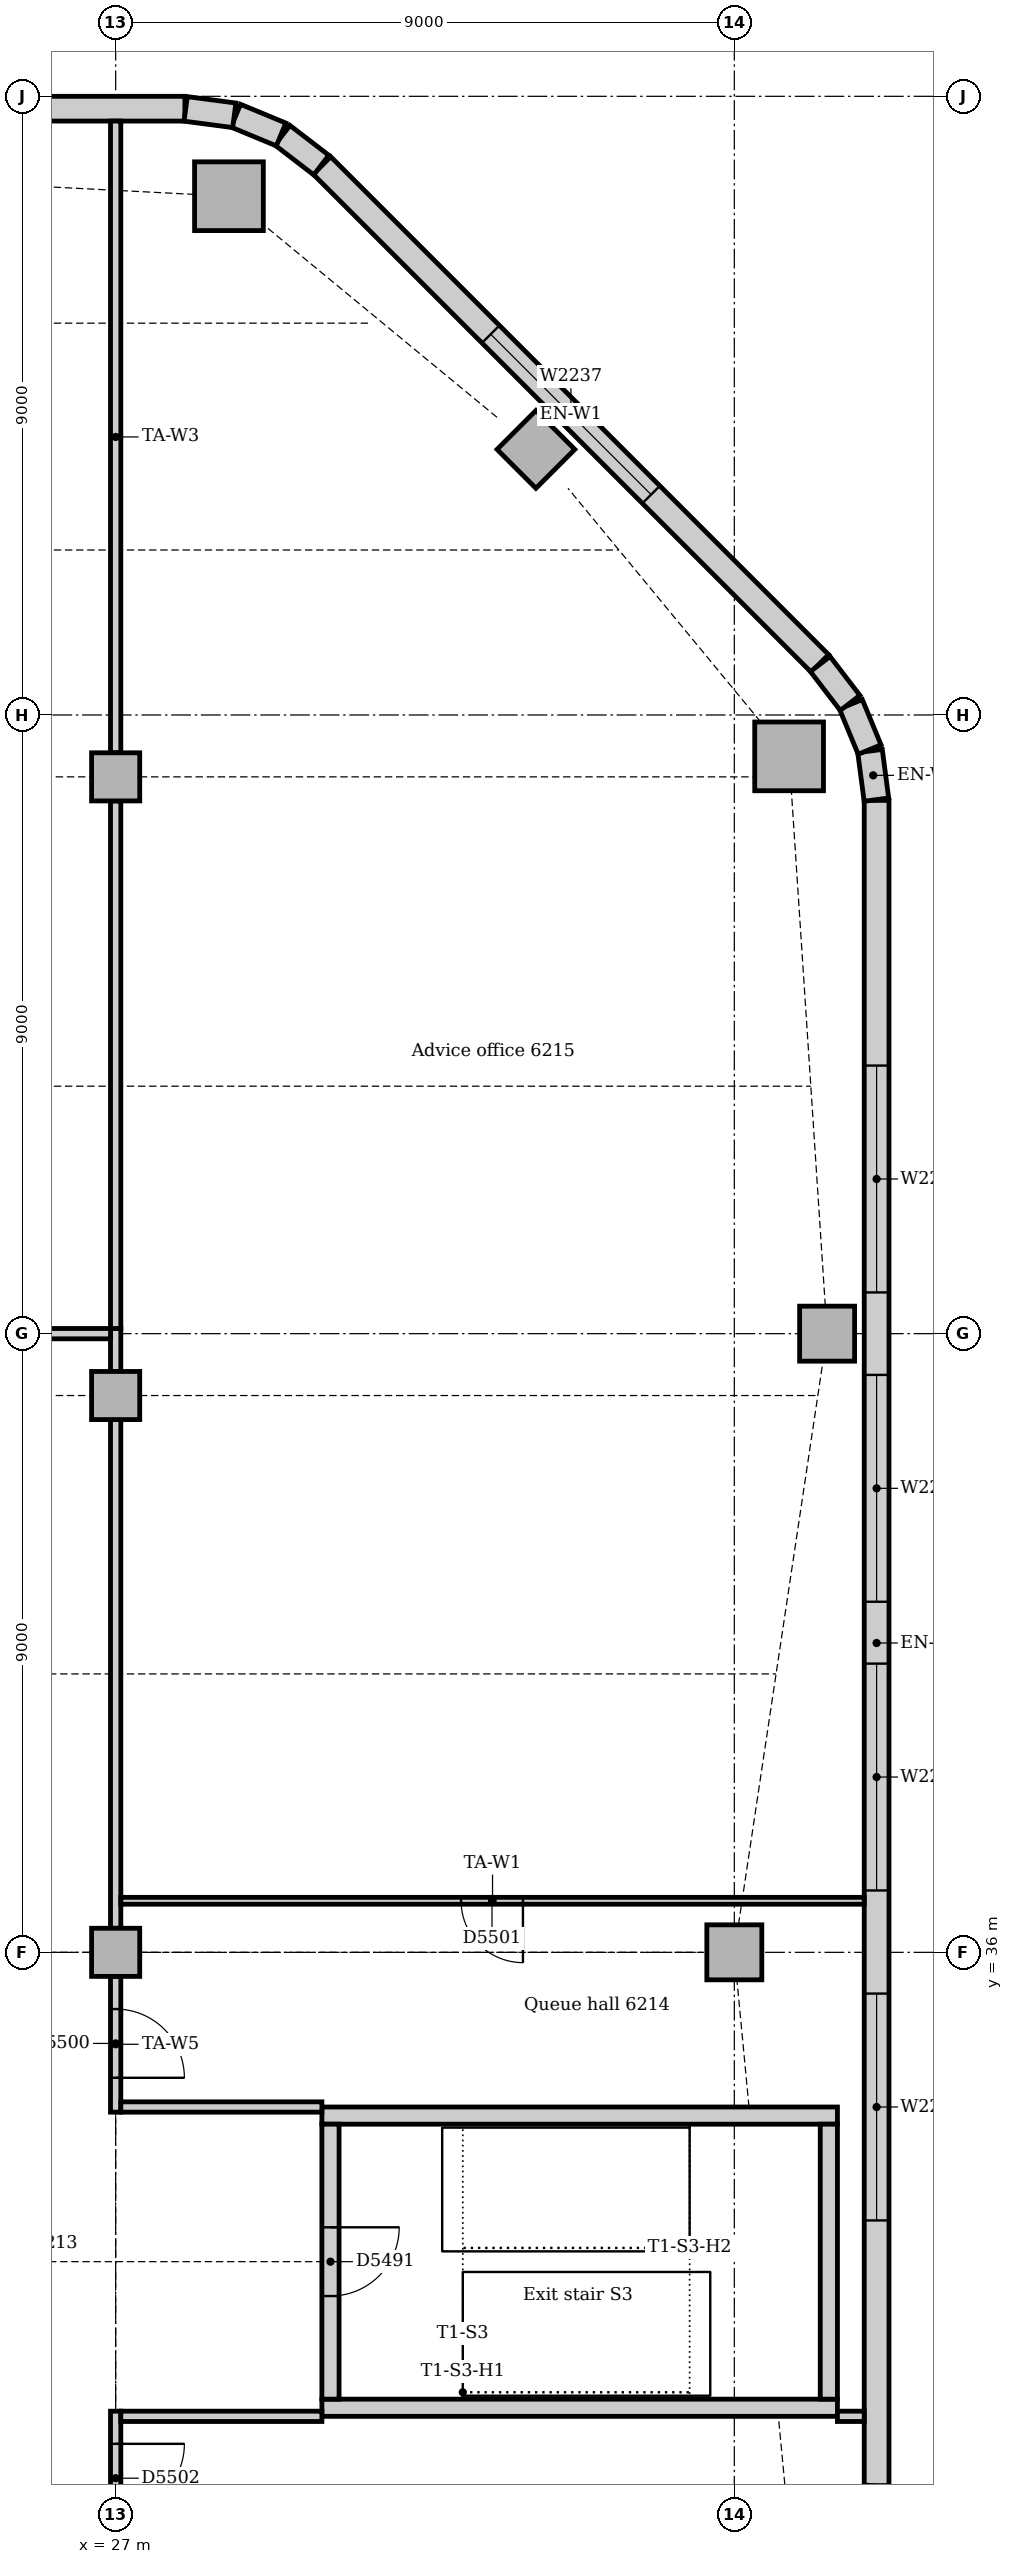
"""IFC4 building model, lengths in metres.
Left out: names, types, materials, properties, quantities, classifications, styles, units other than length and angle.
Written with IfcOpenShell. Run it as: python <this file> out.ifc"""

import sys

from ifc_helpers import new_model, si_unit, direction, frame, frame_2d, origin, origin_2d, place, context, subcontext, project, spatial, rectangle, extrude, element, fill, save


model = new_model("IFC4")
c1 = context("Model", 3, precision=1e-05, world=origin(), true_north=direction((0.0, 1.0)))
c2 = subcontext(c1, "Body", "Model", "MODEL_VIEW")
j1 = project(units=[si_unit("LENGTHUNIT", "METRE"), si_unit("PLANEANGLEUNIT", "RADIAN")], contexts=[c1])
p1 = place(None, origin())
s1 = spatial("IfcSite", under=j1, at=p1, CompositionType="ELEMENT")
p2 = place(p1, origin())
s2 = spatial("IfcBuilding", under=s1, at=p2, CompositionType="ELEMENT")
p3 = place(p2, frame((0.0, 0.0, 259.0)))
s3 = spatial("IfcBuildingStorey", under=s2, at=p3, CompositionType="ELEMENT", Elevation=259.0)
for number, where, z_axis, x_axis in (
    (1, (30.0, 29.375, 0.0), (0.0, 0.0, 1.0), (1.0, 0.0, 0.0)),
    (2, (37.5, 33.625, 0.0), (0.0, 0.0, 1.0), (-1.0, 0.0, 0.0)),
):
    element("IfcWall", number, at=place(p3, frame(where, z_axis=z_axis, x_axis=x_axis)), inside=s3, PredefinedType="SOLIDWALL", context=c2, shape_type="SweptSolid", body=[
        extrude(rectangle(XDim=7.5, YDim=0.25, at=frame_2d((3.75, 0.0))), origin(), (0.0, 0.0, 1.0), 4.0),
    ])
p4 = place(p3, frame((37.375, 29.5, 0.0), z_axis=(0.0, 0.0, 1.0), x_axis=(0.0, 1.0, 0.0)))
e3 = element("IfcWall", 3, at=p4, inside=s3, PredefinedType="SOLIDWALL", context=c2, shape_type="SweptSolid", body=[
    extrude(rectangle(XDim=4.0, YDim=0.25, at=frame_2d((2.0, 0.0))), origin(), (0.0, 0.0, 1.0), 4.0),
])
p5 = place(p3, frame((30.125, 33.5, 0.0), z_axis=(0.0, 0.0, 1.0), x_axis=(0.0, -1.0, 0.0)))
e4 = element("IfcWall", 4, at=p5, inside=s3, PredefinedType="SOLIDWALL", context=c2, shape_type="SweptSolid", body=[
    extrude(rectangle(XDim=4.0, YDim=0.25, at=frame_2d((2.0, 0.0))), origin(), (0.0, 0.0, 1.0), 4.0),
])
p6 = place(p5, frame((1.5, 0.0, 0.0)))
e5 = element("IfcOpeningElement", 5, at=p6, cuts=e4, PredefinedType="OPENING", context=c2, shape_type="SweptSolid", body=[
    extrude(rectangle(XDim=1.0, YDim=2.1, at=frame_2d((0.5, 1.05))), frame((0.0, 0.135, 0.0), z_axis=(0.0, -1.0, 0.0), x_axis=(1.0, 0.0, 0.0)), (0.0, 0.0, 1.0), 0.27),
])
for number, where, z_axis, x_axis in (
    (6, (36.797, 53.398, 0.0), (0.0, 0.0, 1.0), (1.0, 0.0, 0.0)),
    (7, (28.648, 61.547, 0.0), (0.0, 0.0, 1.0), (1.0, 0.0, 0.0)),
):
    element("IfcColumn", number, at=place(p3, frame(where, z_axis=z_axis, x_axis=x_axis)), inside=s3, PredefinedType="COLUMN", context=c2, shape_type="SweptSolid", body=[
        extrude(rectangle(XDim=1.0, YDim=1.0, at=origin_2d()), origin(), (0.0, 0.0, 1.0), 3.85),
    ])
for number, where, z_axis, x_axis in (
    (8, (36.0, 36.0, 0.0), (0.0, 0.0, 1.0), (1.0, 0.0, 0.0)),
    (9, (37.35, 45.0, 0.0), (0.0, 0.0, 1.0), (1.0, 0.0, 0.0)),
    (10, (33.114, 57.864, 0.0), (0.0, 0.0, 1.0), (0.707, 0.707, 0.0)),
):
    element("IfcColumn", number, at=place(p3, frame(where, z_axis=z_axis, x_axis=x_axis)), inside=s3, PredefinedType="COLUMN", context=c2, shape_type="SweptSolid", body=[
        extrude(rectangle(XDim=0.8, YDim=0.8, at=origin_2d()), origin(), (0.0, 0.0, 1.0), 3.85),
    ])
for number, where, z_axis, x_axis in (
    (11, (27.0, 36.0, 0.0), (0.0, 0.0, 1.0), (1.0, 0.0, 0.0)),
    (12, (27.0, 44.1, 0.0), (0.0, 0.0, 1.0), (1.0, 0.0, 0.0)),
    (13, (27.0, 53.1, 0.0), (0.0, 0.0, 1.0), (1.0, 0.0, 0.0)),
):
    element("IfcColumn", number, at=place(p3, frame(where, z_axis=z_axis, x_axis=x_axis)), inside=s3, PredefinedType="COLUMN", context=c2, shape_type="SweptSolid", body=[
        extrude(rectangle(XDim=0.7, YDim=0.7, at=origin_2d()), origin(), (0.0, 0.0, 1.0), 3.85),
    ])
p7 = place(p3, frame((38.07, 28.243, 0.0), z_axis=(0.0, 0.0, 1.0), x_axis=(0.0, 1.0, 0.0)))
e14 = element("IfcWall", 14, at=p7, inside=s3, PredefinedType="STANDARD", context=c2, shape_type="SweptSolid", body=[
    extrude(rectangle(XDim=24.515, YDim=0.36, at=frame_2d((12.257, 0.0))), origin(), (0.0, 0.0, 1.0), 3.85),
])
p8 = place(p7, frame((3.857, 0.0, 0.9)))
e15 = element("IfcOpeningElement", 15, at=p8, cuts=e14, PredefinedType="OPENING", context=c2, shape_type="SweptSolid", body=[
    extrude(rectangle(XDim=3.3, YDim=1.6, at=frame_2d((1.65, 0.8))), frame((0.0, 0.19, 0.0), z_axis=(0.0, -1.0, 0.0), x_axis=(1.0, 0.0, 0.0)), (0.0, 0.0, 1.0), 0.38),
])
p9 = place(p7, frame((8.657, 0.0, 0.9)))
e16 = element("IfcOpeningElement", 16, at=p9, cuts=e14, PredefinedType="OPENING", context=c2, shape_type="SweptSolid", body=[
    extrude(rectangle(XDim=3.3, YDim=1.6, at=frame_2d((1.65, 0.8))), frame((0.0, 0.19, 0.0), z_axis=(0.0, -1.0, 0.0), x_axis=(1.0, 0.0, 0.0)), (0.0, 0.0, 1.0), 0.38),
])
p10 = place(p7, frame((12.857, 0.0, 0.9)))
e17 = element("IfcOpeningElement", 17, at=p10, cuts=e14, PredefinedType="OPENING", context=c2, shape_type="SweptSolid", body=[
    extrude(rectangle(XDim=3.3, YDim=1.6, at=frame_2d((1.65, 0.8))), frame((0.0, 0.19, 0.0), z_axis=(0.0, -1.0, 0.0), x_axis=(1.0, 0.0, 0.0)), (0.0, 0.0, 1.0), 0.38),
])
p11 = place(p7, frame((17.357, 0.0, 0.9)))
e18 = element("IfcOpeningElement", 18, at=p11, cuts=e14, PredefinedType="OPENING", context=c2, shape_type="SweptSolid", body=[
    extrude(rectangle(XDim=3.3, YDim=1.6, at=frame_2d((1.65, 0.8))), frame((0.0, 0.19, 0.0), z_axis=(0.0, -1.0, 0.0), x_axis=(1.0, 0.0, 0.0)), (0.0, 0.0, 1.0), 0.38),
])
p12 = place(p3, frame((37.244, 54.751, 0.0), z_axis=(0.0, 0.0, 1.0), x_axis=(-0.707106781187, 0.707106781187, 0.0)))
e19 = element("IfcWall", 19, at=p12, inside=s3, PredefinedType="STANDARD", context=c2, shape_type="SweptSolid", body=[
    extrude(rectangle(XDim=10.243, YDim=0.36, at=frame_2d((5.121, 0.0))), origin(), (0.0, 0.0, 1.0), 3.85),
])
p13 = place(p12, frame((3.471, 0.0, 0.9)))
e20 = element("IfcOpeningElement", 20, at=p13, cuts=e19, PredefinedType="OPENING", context=c2, shape_type="SweptSolid", body=[
    extrude(rectangle(XDim=3.3, YDim=1.6, at=frame_2d((1.65, 0.8))), frame((0.0, 0.19, 0.0), z_axis=(0.0, -1.0, 0.0), x_axis=(1.0, 0.0, 0.0)), (0.0, 0.0, 1.0), 0.38),
])
p14 = place(p3, frame((28.007, 62.82, 0.0), z_axis=(0.0, 0.0, 1.0), x_axis=(-1.0, 0.0, 0.0)))
e21 = element("IfcWall", 21, at=p14, inside=s3, PredefinedType="STANDARD", context=c2, shape_type="SweptSolid", body=[
    extrude(rectangle(XDim=23.765, YDim=0.36, at=frame_2d((11.882, 0.0))), origin(), (0.0, 0.0, 1.0), 3.85),
])
p15 = place(p14, frame((3.482, 0.0, 0.9)))
e22 = element("IfcOpeningElement", 22, at=p15, cuts=e21, PredefinedType="OPENING", context=c2, shape_type="SweptSolid", body=[
    extrude(rectangle(XDim=3.3, YDim=1.6, at=frame_2d((1.65, 0.8))), frame((0.0, 0.19, 0.0), z_axis=(0.0, -1.0, 0.0), x_axis=(1.0, 0.0, 0.0)), (0.0, 0.0, 1.0), 0.38),
])
p16 = place(p14, frame((8.732, 0.0, 0.9)))
e23 = element("IfcOpeningElement", 23, at=p16, cuts=e21, PredefinedType="OPENING", context=c2, shape_type="SweptSolid", body=[
    extrude(rectangle(XDim=1.8, YDim=1.6, at=frame_2d((0.9, 0.8))), frame((0.0, 0.19, 0.0), z_axis=(0.0, -1.0, 0.0), x_axis=(1.0, 0.0, 0.0)), (0.0, 0.0, 1.0), 0.38),
])
p17 = place(p14, frame((12.482, 0.0, 0.9)))
e24 = element("IfcOpeningElement", 24, at=p17, cuts=e21, PredefinedType="OPENING", context=c2, shape_type="SweptSolid", body=[
    extrude(rectangle(XDim=3.3, YDim=1.6, at=frame_2d((1.65, 0.8))), frame((0.0, 0.19, 0.0), z_axis=(0.0, -1.0, 0.0), x_axis=(1.0, 0.0, 0.0)), (0.0, 0.0, 1.0), 0.38),
])
p18 = place(p14, frame((16.982, 0.0, 0.9)))
e25 = element("IfcOpeningElement", 25, at=p18, cuts=e21, PredefinedType="OPENING", context=c2, shape_type="SweptSolid", body=[
    extrude(rectangle(XDim=3.3, YDim=1.6, at=frame_2d((1.65, 0.8))), frame((0.0, 0.19, 0.0), z_axis=(0.0, -1.0, 0.0), x_axis=(1.0, 0.0, 0.0)), (0.0, 0.0, 1.0), 0.38),
])
for number, where, z_axis, x_axis in (
    (26, (37.974, 27.524, 0.0), (0.0, 0.0, 1.0), (0.131, 0.991, 0.0)),
    (27, (38.067, 52.769, 0.0), (0.0, 0.0, 1.0), (-0.131, 0.991, 0.0)),
    (28, (37.968, 53.497, 0.0), (0.0, 0.0, 1.0), (-0.383, 0.924, 0.0)),
):
    element("IfcWall", number, at=place(p3, frame(where, z_axis=z_axis, x_axis=x_axis)), inside=s3, PredefinedType="STANDARD", context=c2, shape_type="SweptSolid", body=[
        extrude(rectangle(XDim=0.713, YDim=0.36, at=frame_2d((0.356, 0.0))), origin(), (0.0, 0.0, 1.0), 3.85),
    ])
for number, where, z_axis, x_axis in (
    (29, (37.684, 54.175, 0.0), (0.0, 0.0, 1.0), (-0.609, 0.793, 0.0)),
    (30, (29.991, 62.0, 0.0), (0.0, 0.0, 1.0), (-0.793, 0.609, 0.0)),
):
    element("IfcWall", number, at=place(p3, frame(where, z_axis=z_axis, x_axis=x_axis)), inside=s3, PredefinedType="STANDARD", context=c2, shape_type="SweptSolid", body=[
        extrude(rectangle(XDim=0.713, YDim=0.36, at=frame_2d((0.357, 0.0))), origin(), (0.0, 0.0, 1.0), 3.85),
    ])
for number, where, z_axis, x_axis in (
    (31, (29.406, 62.445, 0.0), (0.0, 0.0, 1.0), (-0.924, 0.383, 0.0)),
    (32, (28.726, 62.724, 0.0), (0.0, 0.0, 1.0), (-0.991, 0.131, 0.0)),
):
    element("IfcWall", number, at=place(p3, frame(where, z_axis=z_axis, x_axis=x_axis)), inside=s3, PredefinedType="STANDARD", context=c2, shape_type="SweptSolid", body=[
        extrude(rectangle(XDim=0.713, YDim=0.36, at=frame_2d((0.356, 0.0))), origin(), (0.0, 0.0, 1.0), 3.85),
    ])
p19 = place(p3, frame((27.0, 33.675, 0.0), z_axis=(0.0, 0.0, 1.0), x_axis=(0.0, 1.0, 0.0)))
e33 = element("IfcWall", 33, at=p19, inside=s3, PredefinedType="PARTITIONING", context=c2, shape_type="SweptSolid", body=[
    extrude(rectangle(XDim=1.975, YDim=0.15, at=frame_2d((0.988, 0.0))), origin(), (0.0, 0.0, 1.0), 3.4),
])
p20 = place(p19, frame((0.5, 0.0, 0.0)))
e34 = element("IfcOpeningElement", 34, at=p20, cuts=e33, PredefinedType="OPENING", context=c2, shape_type="SweptSolid", body=[
    extrude(rectangle(XDim=1.0, YDim=2.1, at=frame_2d((0.5, 1.05))), frame((0.0, 0.085, 0.0), z_axis=(0.0, -1.0, 0.0), x_axis=(1.0, 0.0, 0.0)), (0.0, 0.0, 1.0), 0.17),
])
p21 = place(p3, frame((27.0, 36.35, 0.0), z_axis=(0.0, 0.0, 1.0), x_axis=(0.0, 1.0, 0.0)))
e35 = element("IfcWall", 35, at=p21, inside=s3, PredefinedType="PARTITIONING", context=c2, shape_type="SweptSolid", body=[
    extrude(rectangle(XDim=7.4, YDim=0.15, at=frame_2d((3.7, 0.0))), origin(), (0.0, 0.0, 1.0), 3.4),
])
p22 = place(p3, frame((27.0, 44.45, 0.0), z_axis=(0.0, 0.0, 1.0), x_axis=(0.0, 1.0, 0.0)))
e36 = element("IfcWall", 36, at=p22, inside=s3, PredefinedType="PARTITIONING", context=c2, shape_type="SweptSolid", body=[
    extrude(rectangle(XDim=0.625, YDim=0.15, at=frame_2d((0.312, 0.0))), origin(), (0.0, 0.0, 1.0), 3.4),
])
p23 = place(p3, frame((27.0, 27.35, 0.0), z_axis=(0.0, 0.0, 1.0), x_axis=(0.0, 1.0, 0.0)))
e37 = element("IfcWall", 37, at=p23, inside=s3, PredefinedType="PARTITIONING", context=c2, shape_type="SweptSolid", body=[
    extrude(rectangle(XDim=1.975, YDim=0.15, at=frame_2d((0.988, 0.0))), origin(), (0.0, 0.0, 1.0), 3.4),
])
p24 = place(p23, frame((0.5, 0.0, 0.0)))
e38 = element("IfcOpeningElement", 38, at=p24, cuts=e37, PredefinedType="OPENING", context=c2, shape_type="SweptSolid", body=[
    extrude(rectangle(XDim=1.0, YDim=2.1, at=frame_2d((0.5, 1.05))), frame((0.0, 0.085, 0.0), z_axis=(0.0, -1.0, 0.0), x_axis=(1.0, 0.0, 0.0)), (0.0, 0.0, 1.0), 0.17),
])
p25 = place(p3, frame((22.425, 45.0, 0.0), z_axis=(0.0, 0.0, 1.0), x_axis=(1.0, 0.0, 0.0)))
e39 = element("IfcWall", 39, at=p25, inside=s3, PredefinedType="PARTITIONING", context=c2, shape_type="SweptSolid", body=[
    extrude(rectangle(XDim=4.5, YDim=0.15, at=frame_2d((2.25, 0.0))), origin(), (0.0, 0.0, 1.0), 3.85),
])
p26 = place(p25, frame((1.75, 0.0, 0.0)))
e40 = element("IfcOpeningElement", 40, at=p26, cuts=e39, PredefinedType="OPENING", context=c2, shape_type="SweptSolid", body=[
    extrude(rectangle(XDim=1.0, YDim=2.1, at=frame_2d((0.5, 1.05))), frame((0.0, 0.085, 0.0), z_axis=(0.0, -1.0, 0.0), x_axis=(1.0, 0.0, 0.0)), (0.0, 0.0, 1.0), 0.17),
])
for number, where, z_axis, x_axis in (
    (41, (27.075, 29.25, 0.0), (0.0, 0.0, 1.0), (1.0, 0.0, 0.0)),
    (42, (27.075, 33.75, 0.0), (0.0, 0.0, 1.0), (1.0, 0.0, 0.0)),
):
    element("IfcWall", number, at=place(p3, frame(where, z_axis=z_axis, x_axis=x_axis)), inside=s3, PredefinedType="PARTITIONING", context=c2, shape_type="SweptSolid", body=[
        extrude(rectangle(XDim=2.925, YDim=0.15, at=frame_2d((1.462, 0.0))), origin(), (0.0, 0.0, 1.0), 3.85),
    ])
p27 = place(p3, frame((27.0, 53.45, 0.0), z_axis=(0.0, 0.0, 1.0), x_axis=(0.0, 1.0, 0.0)))
e43 = element("IfcWall", 43, at=p27, inside=s3, PredefinedType="PARTITIONING", context=c2, shape_type="SweptSolid", body=[
    extrude(rectangle(XDim=9.19, YDim=0.15, at=frame_2d((4.595, 0.0))), origin(), (0.0, 0.0, 1.0), 3.4),
])
p28 = place(p3, frame((27.0, 45.075, 0.0), z_axis=(0.0, 0.0, 1.0), x_axis=(0.0, 1.0, 0.0)))
e44 = element("IfcWall", 44, at=p28, inside=s3, PredefinedType="PARTITIONING", context=c2, shape_type="SweptSolid", body=[
    extrude(rectangle(XDim=7.675, YDim=0.15, at=frame_2d((3.837, 0.0))), origin(), (0.0, 0.0, 1.0), 3.4),
])
p29 = place(p3, frame((37.5, 29.25, 0.0), z_axis=(0.0, 0.0, 1.0), x_axis=(1.0, 0.0, 0.0)))
e45 = element("IfcWall", 45, at=p29, inside=s3, PredefinedType="PARTITIONING", context=c2, shape_type="SweptSolid", body=[
    extrude(rectangle(XDim=0.39, YDim=0.15, at=frame_2d((0.195, 0.0))), origin(), (0.0, 0.0, 1.0), 3.85),
])
p30 = place(p3, frame((27.075, 36.75, 0.0), z_axis=(0.0, 0.0, 1.0), x_axis=(1.0, 0.0, 0.0)))
e46 = element("IfcWall", 46, at=p30, inside=s3, PredefinedType="PARTITIONING", context=c2, shape_type="SweptSolid", body=[
    extrude(rectangle(XDim=10.815, YDim=0.1, at=frame_2d((5.407, 0.0))), origin(), (0.0, 0.0, 1.0), 3.85),
])
p31 = place(p30, frame((4.95, 0.0, 0.0)))
e47 = element("IfcOpeningElement", 47, at=p31, cuts=e46, PredefinedType="OPENING", context=c2, shape_type="SweptSolid", body=[
    extrude(rectangle(XDim=0.9, YDim=2.1, at=frame_2d((0.45, 1.05))), frame((0.0, 0.06, 0.0), z_axis=(0.0, -1.0, 0.0), x_axis=(1.0, 0.0, 0.0)), (0.0, 0.0, 1.0), 0.12),
])
p32 = place(p8, origin())
e48 = element("IfcWindow", 48, at=p32, inside=s3, PartitioningType="SINGLE_PANEL", PredefinedType="WINDOW", context=c2, shape_type="SweptSolid", body=[
    extrude(rectangle(XDim=3.3, YDim=1.6, at=frame_2d((1.65, 0.8))), frame((0.0, 0.13, 0.0), z_axis=(0.0, -1.0, 0.0), x_axis=(1.0, 0.0, 0.0)), (0.0, 0.0, 1.0), 0.06),
])
fill(e15, e48)
p33 = place(p9, origin())
e49 = element("IfcWindow", 49, at=p33, inside=s3, PartitioningType="SINGLE_PANEL", PredefinedType="WINDOW", context=c2, shape_type="SweptSolid", body=[
    extrude(rectangle(XDim=3.3, YDim=1.6, at=frame_2d((1.65, 0.8))), frame((0.0, 0.13, 0.0), z_axis=(0.0, -1.0, 0.0), x_axis=(1.0, 0.0, 0.0)), (0.0, 0.0, 1.0), 0.06),
])
fill(e16, e49)
p34 = place(p10, origin())
e50 = element("IfcWindow", 50, at=p34, inside=s3, PartitioningType="SINGLE_PANEL", PredefinedType="WINDOW", context=c2, shape_type="SweptSolid", body=[
    extrude(rectangle(XDim=3.3, YDim=1.6, at=frame_2d((1.65, 0.8))), frame((0.0, 0.13, 0.0), z_axis=(0.0, -1.0, 0.0), x_axis=(1.0, 0.0, 0.0)), (0.0, 0.0, 1.0), 0.06),
])
fill(e17, e50)
p35 = place(p11, origin())
e51 = element("IfcWindow", 51, at=p35, inside=s3, PartitioningType="SINGLE_PANEL", PredefinedType="WINDOW", context=c2, shape_type="SweptSolid", body=[
    extrude(rectangle(XDim=3.3, YDim=1.6, at=frame_2d((1.65, 0.8))), frame((0.0, 0.13, 0.0), z_axis=(0.0, -1.0, 0.0), x_axis=(1.0, 0.0, 0.0)), (0.0, 0.0, 1.0), 0.06),
])
fill(e18, e51)
p36 = place(p13, origin())
e52 = element("IfcWindow", 52, at=p36, inside=s3, PartitioningType="SINGLE_PANEL", PredefinedType="WINDOW", context=c2, shape_type="SweptSolid", body=[
    extrude(rectangle(XDim=3.3, YDim=1.6, at=frame_2d((1.65, 0.8))), frame((0.0, 0.13, 0.0), z_axis=(0.0, -1.0, 0.0), x_axis=(1.0, 0.0, 0.0)), (0.0, 0.0, 1.0), 0.06),
])
fill(e20, e52)
p37 = place(p6, origin())
e53 = element("IfcDoor", 53, at=p37, inside=s3, OperationType="SINGLE_SWING_LEFT", PredefinedType="DOOR", context=c2, shape_type="SweptSolid", body=[
    extrude(rectangle(XDim=1.0, YDim=2.1, at=frame_2d((0.5, 1.05))), frame((0.0, 0.025, 0.0), z_axis=(0.0, -1.0, 0.0), x_axis=(1.0, 0.0, 0.0)), (0.0, 0.0, 1.0), 0.05),
])
fill(e5, e53)
p38 = place(p20, frame((1.0, 0.0, 0.0), z_axis=(0.0, 0.0, 1.0), x_axis=(-1.0, 0.0, 0.0)))
e54 = element("IfcDoor", 54, at=p38, inside=s3, OperationType="SINGLE_SWING_RIGHT", PredefinedType="DOOR", context=c2, shape_type="SweptSolid", body=[
    extrude(rectangle(XDim=1.0, YDim=2.1, at=frame_2d((0.5, 1.05))), frame((0.0, 0.025, 0.0), z_axis=(0.0, -1.0, 0.0), x_axis=(1.0, 0.0, 0.0)), (0.0, 0.0, 1.0), 0.05),
])
fill(e34, e54)
p39 = place(p31, frame((0.9, 0.0, 0.0), z_axis=(0.0, 0.0, 1.0), x_axis=(-1.0, 0.0, 0.0)))
e55 = element("IfcDoor", 55, at=p39, inside=s3, OperationType="SINGLE_SWING_LEFT", PredefinedType="DOOR", context=c2, shape_type="SweptSolid", body=[
    extrude(rectangle(XDim=0.9, YDim=2.1, at=frame_2d((0.45, 1.05))), frame((0.0, 0.025, 0.0), z_axis=(0.0, -1.0, 0.0), x_axis=(1.0, 0.0, 0.0)), (0.0, 0.0, 1.0), 0.05),
])
fill(e47, e55)
p40 = place(p24, frame((1.0, 0.0, 0.0), z_axis=(0.0, 0.0, 1.0), x_axis=(-1.0, 0.0, 0.0)))
e56 = element("IfcDoor", 56, at=p40, inside=s3, OperationType="SINGLE_SWING_LEFT", PredefinedType="DOOR", context=c2, shape_type="SweptSolid", body=[
    extrude(rectangle(XDim=1.0, YDim=2.1, at=frame_2d((0.5, 1.05))), frame((0.0, 0.025, 0.0), z_axis=(0.0, -1.0, 0.0), x_axis=(1.0, 0.0, 0.0)), (0.0, 0.0, 1.0), 0.05),
])
fill(e38, e56)
save(model, sys.argv[1])
